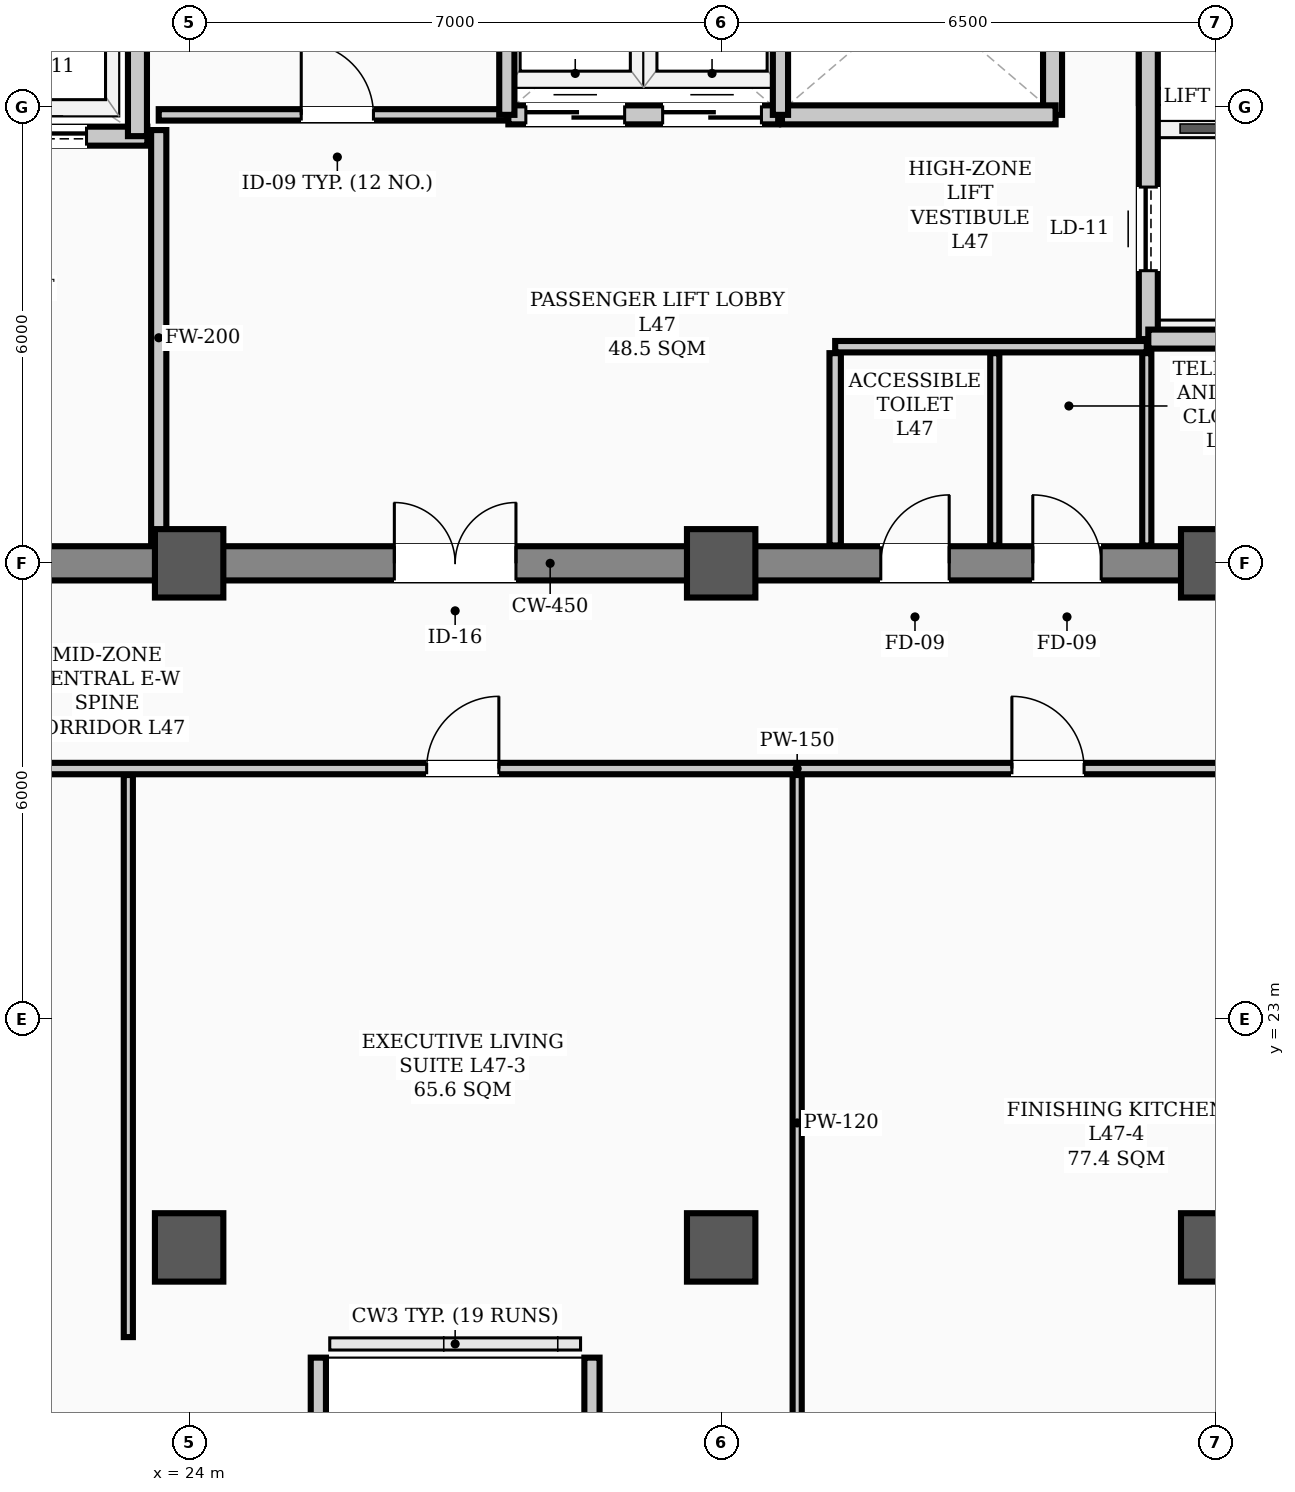
"""IFC4 building model, lengths in metres.
Left out: names, types, materials, properties, quantities, classifications, styles, units other than length and angle.
Written with IfcOpenShell. Run it as: python <this file> out.ifc"""

import sys

from ifc_helpers import new_model, si_unit, direction, frame, frame_2d, origin, origin_2d, place, context, subcontext, project, spatial, rectangle, hollow_rectangle, extrude, element, fill, save


model = new_model("IFC4")
c1 = context("Model", 3, precision=1e-05, world=origin(), true_north=direction((0.0, 1.0)))
c2 = subcontext(c1, "Body", "Model", "MODEL_VIEW")
j1 = project(units=[si_unit("LENGTHUNIT", "METRE"), si_unit("PLANEANGLEUNIT", "RADIAN")], contexts=[c1])
p1 = place(None, origin())
s1 = spatial("IfcSite", under=j1, at=p1, CompositionType="ELEMENT")
p2 = place(p1, origin())
s2 = spatial("IfcBuilding", under=s1, at=p2, CompositionType="ELEMENT")
p3 = place(p2, frame((0.0, 0.0, 189.0)))
s3 = spatial("IfcBuildingStorey", under=s2, at=p3, CompositionType="ELEMENT", Elevation=189.0)
for number, where, z_axis, x_axis in (
    (1, (24.0, 29.0, 0.0), (0.0, 0.0, 1.0), (1.0, 0.0, 0.0)),
    (2, (31.0, 29.0, 0.0), (0.0, 0.0, 1.0), (1.0, 0.0, 0.0)),
    (3, (37.5, 29.0, 0.0), (0.0, 0.0, 1.0), (1.0, 0.0, 0.0)),
    (4, (24.0, 20.0, 0.0), (0.0, 0.0, 1.0), (1.0, 0.0, 0.0)),
    (5, (31.0, 20.0, 0.0), (0.0, 0.0, 1.0), (1.0, 0.0, 0.0)),
    (6, (37.5, 20.0, 0.0), (0.0, 0.0, 1.0), (1.0, 0.0, 0.0)),
):
    element("IfcColumn", number, at=place(p3, frame(where, z_axis=z_axis, x_axis=x_axis)), inside=s3, PredefinedType="COLUMN", context=c2, shape_type="SweptSolid", body=[
        extrude(hollow_rectangle(XDim=0.9, YDim=0.9, WallThickness=0.035, InnerFilletRadius=0.017, OuterFilletRadius=0.052, at=origin_2d()), origin(), (0.0, 0.0, 1.0), 3.9),
    ])
for number, where, z_axis, x_axis in (
    (7, (25.7, 16.85, 0.0), (0.0, 0.0, 1.0), (0.0, 1.0, 0.0)),
    (8, (29.3, 18.55, 0.0), (0.0, 0.0, 1.0), (0.0, -1.0, 0.0)),
):
    element("IfcWall", number, at=place(p3, frame(where, z_axis=z_axis, x_axis=x_axis)), inside=s3, PredefinedType="PARAPET", context=c2, shape_type="SweptSolid", body=[
        extrude(rectangle(XDim=1.7, YDim=0.2, at=frame_2d((0.85, 0.0))), origin(), (0.0, 0.0, 1.0), 1.2),
    ])
p4 = place(p3, frame((13.5, 29.0, 0.0), z_axis=(0.0, 0.0, 1.0), x_axis=(1.0, 0.0, 0.0)))
e9 = element("IfcWall", 9, at=p4, inside=s3, PredefinedType="SHEAR", context=c2, shape_type="SweptSolid", body=[
    extrude(rectangle(XDim=30.5, YDim=0.45, at=frame_2d((15.25, 0.0))), origin(), (0.0, 0.0, 1.0), 3.72),
])
p5 = place(p4, frame((1.75, 0.0, 0.0)))
e10 = element("IfcOpeningElement", 10, at=p5, cuts=e9, PredefinedType="OPENING", context=c2, shape_type="SweptSolid", body=[
    extrude(rectangle(XDim=1.1, YDim=2.08, at=frame_2d((0.55, 1.04))), frame((0.0, 0.235, 0.0), z_axis=(0.0, -1.0, 0.0), x_axis=(1.0, 0.0, 0.0)), (0.0, 0.0, 1.0), 0.47),
])
p6 = place(p4, frame((26.7, 0.0, 0.0)))
e11 = element("IfcOpeningElement", 11, at=p6, cuts=e9, PredefinedType="OPENING", context=c2, shape_type="SweptSolid", body=[
    extrude(rectangle(XDim=1.1, YDim=2.08, at=frame_2d((0.55, 1.04))), frame((0.0, 0.235, 0.0), z_axis=(0.0, -1.0, 0.0), x_axis=(1.0, 0.0, 0.0)), (0.0, 0.0, 1.0), 0.47),
])
p7 = place(p4, frame((6.8, 0.0, 0.0)))
e12 = element("IfcOpeningElement", 12, at=p7, cuts=e9, PredefinedType="OPENING", context=c2, shape_type="SweptSolid", body=[
    extrude(rectangle(XDim=1.1, YDim=2.08, at=frame_2d((0.55, 1.04))), frame((0.0, 0.235, 0.0), z_axis=(0.0, -1.0, 0.0), x_axis=(1.0, 0.0, 0.0)), (0.0, 0.0, 1.0), 0.47),
])
p8 = place(p4, frame((13.2, 0.0, 0.0)))
e13 = element("IfcOpeningElement", 13, at=p8, cuts=e9, PredefinedType="OPENING", context=c2, shape_type="SweptSolid", body=[
    extrude(rectangle(XDim=1.6, YDim=2.08, at=frame_2d((0.8, 1.04))), frame((0.0, 0.235, 0.0), z_axis=(0.0, -1.0, 0.0), x_axis=(1.0, 0.0, 0.0)), (0.0, 0.0, 1.0), 0.47),
])
p9 = place(p4, frame((19.6, 0.0, 0.0)))
e14 = element("IfcOpeningElement", 14, at=p9, cuts=e9, PredefinedType="OPENING", context=c2, shape_type="SweptSolid", body=[
    extrude(rectangle(XDim=0.9, YDim=2.08, at=frame_2d((0.45, 1.04))), frame((0.0, 0.235, 0.0), z_axis=(0.0, -1.0, 0.0), x_axis=(1.0, 0.0, 0.0)), (0.0, 0.0, 1.0), 0.47),
])
p10 = place(p4, frame((21.6, 0.0, 0.0)))
e15 = element("IfcOpeningElement", 15, at=p10, cuts=e9, PredefinedType="OPENING", context=c2, shape_type="SweptSolid", body=[
    extrude(rectangle(XDim=0.9, YDim=2.08, at=frame_2d((0.45, 1.04))), frame((0.0, 0.235, 0.0), z_axis=(0.0, -1.0, 0.0), x_axis=(1.0, 0.0, 0.0)), (0.0, 0.0, 1.0), 0.47),
])
p11 = place(p3, frame((18.1, 34.62, 0.0), z_axis=(0.0, 0.0, 1.0), x_axis=(1.0, 0.0, 0.0)))
e16 = element("IfcWall", 16, at=p11, inside=s3, PredefinedType="STANDARD", context=c2, shape_type="SweptSolid", body=[
    extrude(rectangle(XDim=5.35, YDim=0.25, at=frame_2d((2.675, 0.0))), origin(), (0.0, 0.0, 1.0), 3.72),
])
p12 = place(p11, frame((0.85, 0.0, 0.0)))
e17 = element("IfcOpeningElement", 17, at=p12, cuts=e16, PredefinedType="OPENING", context=c2, shape_type="SweptSolid", body=[
    extrude(rectangle(XDim=1.1, YDim=2.08, at=frame_2d((0.55, 1.04))), frame((0.0, 0.135, 0.0), z_axis=(0.0, -1.0, 0.0), x_axis=(1.0, 0.0, 0.0)), (0.0, 0.0, 1.0), 0.27),
])
p13 = place(p11, frame((3.45, 0.0, 0.0)))
e18 = element("IfcOpeningElement", 18, at=p13, cuts=e16, PredefinedType="OPENING", context=c2, shape_type="SweptSolid", body=[
    extrude(rectangle(XDim=1.1, YDim=2.08, at=frame_2d((0.55, 1.04))), frame((0.0, 0.135, 0.0), z_axis=(0.0, -1.0, 0.0), x_axis=(1.0, 0.0, 0.0)), (0.0, 0.0, 1.0), 0.27),
])
p14 = place(p3, frame((36.62, 31.95, 0.0), z_axis=(0.0, 0.0, 1.0), x_axis=(0.0, 1.0, 0.0)))
e19 = element("IfcWall", 19, at=p14, inside=s3, PredefinedType="STANDARD", context=c2, shape_type="SweptSolid", body=[
    extrude(rectangle(XDim=6.0, YDim=0.25, at=frame_2d((3.0, 0.0))), origin(), (0.0, 0.0, 1.0), 3.35),
])
p15 = place(p14, frame((0.9, 0.0, 0.0)))
e20 = element("IfcOpeningElement", 20, at=p15, cuts=e19, PredefinedType="OPENING", context=c2, shape_type="SweptSolid", body=[
    extrude(rectangle(XDim=1.1, YDim=2.08, at=frame_2d((0.55, 1.04))), frame((0.0, 0.135, 0.0), z_axis=(0.0, -1.0, 0.0), x_axis=(1.0, 0.0, 0.0)), (0.0, 0.0, 1.0), 0.27),
])
p16 = place(p14, frame((4.0, 0.0, 0.0)))
e21 = element("IfcOpeningElement", 21, at=p16, cuts=e19, PredefinedType="OPENING", context=c2, shape_type="SweptSolid", body=[
    extrude(rectangle(XDim=1.1, YDim=2.08, at=frame_2d((0.55, 1.04))), frame((0.0, 0.135, 0.0), z_axis=(0.0, -1.0, 0.0), x_axis=(1.0, 0.0, 0.0)), (0.0, 0.0, 1.0), 0.27),
])
p17 = place(p3, frame((36.62, 31.95, 0.0), z_axis=(0.0, 0.0, 1.0), x_axis=(1.0, 0.0, 0.0)))
e22 = element("IfcWall", 22, at=p17, inside=s3, PredefinedType="STANDARD", context=c2, shape_type="SweptSolid", body=[
    extrude(rectangle(XDim=1.9, YDim=0.25, at=frame_2d((0.95, 0.0))), origin(), (0.0, 0.0, 1.0), 3.48),
])
p18 = place(p3, frame((23.32, 34.62, 0.0), z_axis=(0.0, 0.0, 1.0), x_axis=(0.0, 1.0, 0.0)))
e23 = element("IfcWall", 23, at=p18, inside=s3, PredefinedType="STANDARD", context=c2, shape_type="SweptSolid", body=[
    extrude(rectangle(XDim=3.33, YDim=0.25, at=frame_2d((1.665, 0.0))), origin(), (0.0, 0.0, 1.0), 3.35),
])
p19 = place(p3, frame((35.36, 34.9, 0.0), z_axis=(0.0, 0.0, 1.0), x_axis=(0.0, 1.0, 0.0)))
e24 = element("IfcWall", 24, at=p19, inside=s3, PredefinedType="STANDARD", context=c2, shape_type="SweptSolid", body=[
    extrude(rectangle(XDim=3.05, YDim=0.25, at=frame_2d((1.525, 0.0))), origin(), (0.0, 0.0, 1.0), 3.35),
])
p20 = place(p3, frame((28.2, 34.9, 0.0), z_axis=(0.0, 0.0, 1.0), x_axis=(1.0, 0.0, 0.0)))
e25 = element("IfcWall", 25, at=p20, inside=s3, PredefinedType="STANDARD", context=c2, shape_type="SweptSolid", body=[
    extrude(rectangle(XDim=3.55, YDim=0.25, at=frame_2d((1.775, 0.0))), origin(), (0.0, 0.0, 1.0), 3.72),
])
p21 = place(p20, frame((0.23, 0.0, 0.0)))
e26 = element("IfcOpeningElement", 26, at=p21, cuts=e25, PredefinedType="OPENING", context=c2, shape_type="SweptSolid", body=[
    extrude(rectangle(XDim=1.3, YDim=2.08, at=frame_2d((0.65, 1.04))), frame((0.0, 0.135, 0.0), z_axis=(0.0, -1.0, 0.0), x_axis=(1.0, 0.0, 0.0)), (0.0, 0.0, 1.0), 0.27),
])
p22 = place(p20, frame((2.03, 0.0, 0.0)))
e27 = element("IfcOpeningElement", 27, at=p22, cuts=e25, PredefinedType="OPENING", context=c2, shape_type="SweptSolid", body=[
    extrude(rectangle(XDim=1.3, YDim=2.08, at=frame_2d((0.65, 1.04))), frame((0.0, 0.135, 0.0), z_axis=(0.0, -1.0, 0.0), x_axis=(1.0, 0.0, 0.0)), (0.0, 0.0, 1.0), 0.27),
])
p23 = place(p3, frame((31.8, 34.9, 0.0), z_axis=(0.0, 0.0, 1.0), x_axis=(1.0, 0.0, 0.0)))
e28 = element("IfcWall", 28, at=p23, inside=s3, PredefinedType="STANDARD", context=c2, shape_type="SweptSolid", body=[
    extrude(rectangle(XDim=3.6, YDim=0.25, at=frame_2d((1.8, 0.0))), origin(), (0.0, 0.0, 1.0), 3.72),
])
p24 = place(p3, frame((23.6, 34.9, 0.0), z_axis=(0.0, 0.0, 1.0), x_axis=(1.0, 0.0, 0.0)))
e29 = element("IfcWall", 29, at=p24, inside=s3, PredefinedType="PARTITIONING", context=c2, shape_type="SweptSolid", body=[
    extrude(rectangle(XDim=4.58, YDim=0.15, at=frame_2d((2.29, 0.0))), origin(), (0.0, 0.0, 1.0), 3.72),
])
p25 = place(p24, frame((1.875, 0.0, 0.0)))
e30 = element("IfcOpeningElement", 30, at=p25, cuts=e29, PredefinedType="OPENING", context=c2, shape_type="SweptSolid", body=[
    extrude(rectangle(XDim=0.95, YDim=2.08, at=frame_2d((0.475, 1.04))), frame((0.0, 0.085, 0.0), z_axis=(0.0, -1.0, 0.0), x_axis=(1.0, 0.0, 0.0)), (0.0, 0.0, 1.0), 0.17),
])
p26 = place(p3, frame((32.5, 31.85, 0.0), z_axis=(0.0, 0.0, 1.0), x_axis=(1.0, 0.0, 0.0)))
e31 = element("IfcWall", 31, at=p26, inside=s3, PredefinedType="PARTITIONING", context=c2, shape_type="SweptSolid", body=[
    extrude(rectangle(XDim=4.1, YDim=0.15, at=frame_2d((2.05, 0.0))), origin(), (0.0, 0.0, 1.0), 3.72),
])
p27 = place(p3, frame((10.31, 26.3, 0.0), z_axis=(0.0, 0.0, 1.0), x_axis=(1.0, 0.0, 0.0)))
e32 = element("IfcWall", 32, at=p27, inside=s3, PredefinedType="PARTITIONING", context=c2, shape_type="SweptSolid", body=[
    extrude(rectangle(XDim=43.38, YDim=0.15, at=frame_2d((21.69, 0.0))), origin(), (0.0, 0.0, 1.0), 3.2),
])
p28 = place(p27, frame((0.97, 0.0, 0.0)))
e33 = element("IfcOpeningElement", 33, at=p28, cuts=e32, PredefinedType="OPENING", context=c2, shape_type="SweptSolid", body=[
    extrude(rectangle(XDim=0.95, YDim=2.08, at=frame_2d((0.475, 1.04))), frame((0.0, 0.085, 0.0), z_axis=(0.0, -1.0, 0.0), x_axis=(1.0, 0.0, 0.0)), (0.0, 0.0, 1.0), 0.17),
])
p29 = place(p27, frame((8.315, 0.0, 0.0)))
e34 = element("IfcOpeningElement", 34, at=p29, cuts=e32, PredefinedType="OPENING", context=c2, shape_type="SweptSolid", body=[
    extrude(rectangle(XDim=0.95, YDim=2.08, at=frame_2d((0.475, 1.04))), frame((0.0, 0.085, 0.0), z_axis=(0.0, -1.0, 0.0), x_axis=(1.0, 0.0, 0.0)), (0.0, 0.0, 1.0), 0.17),
])
p30 = place(p27, frame((16.815, 0.0, 0.0)))
e35 = element("IfcOpeningElement", 35, at=p30, cuts=e32, PredefinedType="OPENING", context=c2, shape_type="SweptSolid", body=[
    extrude(rectangle(XDim=0.95, YDim=2.08, at=frame_2d((0.475, 1.04))), frame((0.0, 0.085, 0.0), z_axis=(0.0, -1.0, 0.0), x_axis=(1.0, 0.0, 0.0)), (0.0, 0.0, 1.0), 0.17),
])
p31 = place(p27, frame((24.515, 0.0, 0.0)))
e36 = element("IfcOpeningElement", 36, at=p31, cuts=e32, PredefinedType="OPENING", context=c2, shape_type="SweptSolid", body=[
    extrude(rectangle(XDim=0.95, YDim=2.08, at=frame_2d((0.475, 1.04))), frame((0.0, 0.085, 0.0), z_axis=(0.0, -1.0, 0.0), x_axis=(1.0, 0.0, 0.0)), (0.0, 0.0, 1.0), 0.17),
])
p32 = place(p27, frame((31.69, 0.0, 0.0)))
e37 = element("IfcOpeningElement", 37, at=p32, cuts=e32, PredefinedType="OPENING", context=c2, shape_type="SweptSolid", body=[
    extrude(rectangle(XDim=0.95, YDim=2.08, at=frame_2d((0.475, 1.04))), frame((0.0, 0.085, 0.0), z_axis=(0.0, -1.0, 0.0), x_axis=(1.0, 0.0, 0.0)), (0.0, 0.0, 1.0), 0.17),
])
p33 = place(p3, frame((23.6, 29.235, 0.0), z_axis=(0.0, 0.0, 1.0), x_axis=(0.0, 1.0, 0.0)))
e38 = element("IfcWall", 38, at=p33, inside=s3, PredefinedType="STANDARD", context=c2, shape_type="SweptSolid", body=[
    extrude(rectangle(XDim=5.465, YDim=0.2, at=frame_2d((2.732, 0.0))), origin(), (0.0, 0.0, 1.0), 3.2),
])
p34 = place(p3, frame((32.5, 29.235, 0.0), z_axis=(0.0, 0.0, 1.0), x_axis=(0.0, 1.0, 0.0)))
e39 = element("IfcWall", 39, at=p34, inside=s3, PredefinedType="PARTITIONING", context=c2, shape_type="SweptSolid", body=[
    extrude(rectangle(XDim=2.53, YDim=0.15, at=frame_2d((1.265, 0.0))), origin(), (0.0, 0.0, 1.0), 3.35),
])
for number, where, z_axis, x_axis in (
    (40, (36.6, 29.235, 0.0), (0.0, 0.0, 1.0), (0.0, 1.0, 0.0)),
    (41, (34.6, 29.235, 0.0), (0.0, 0.0, 1.0), (0.0, 1.0, 0.0)),
):
    element("IfcWall", number, at=place(p3, frame(where, z_axis=z_axis, x_axis=x_axis)), inside=s3, PredefinedType="PARTITIONING", context=c2, shape_type="SweptSolid", body=[
        extrude(rectangle(XDim=2.53, YDim=0.12, at=frame_2d((1.265, 0.0))), origin(), (0.0, 0.0, 1.0), 3.35),
    ])
p35 = place(p3, frame((23.2, 18.82, 0.0), z_axis=(0.0, 0.0, 1.0), x_axis=(0.0, 1.0, 0.0)))
e42 = element("IfcWall", 42, at=p35, inside=s3, PredefinedType="PARTITIONING", context=c2, shape_type="SweptSolid", body=[
    extrude(rectangle(XDim=7.395, YDim=0.12, at=frame_2d((3.698, 0.0))), origin(), (0.0, 0.0, 1.0), 3.1),
])
p36 = place(p3, frame((32.0, 17.06, 0.0), z_axis=(0.0, 0.0, 1.0), x_axis=(0.0, 1.0, 0.0)))
e43 = element("IfcWall", 43, at=p36, inside=s3, PredefinedType="PARTITIONING", context=c2, shape_type="SweptSolid", body=[
    extrude(rectangle(XDim=9.155, YDim=0.12, at=frame_2d((4.578, 0.0))), origin(), (0.0, 0.0, 1.0), 3.1),
])
for number, where, z_axis, x_axis in (
    (44, (28.18, 34.9, 0.0), (0.0, 0.0, 1.0), (0.0, 1.0, 0.0)),
    (45, (31.78, 34.9, 0.0), (0.0, 0.0, 1.0), (0.0, 1.0, 0.0)),
):
    element("IfcWall", number, at=place(p3, frame(where, z_axis=z_axis, x_axis=x_axis)), inside=s3, PredefinedType="STANDARD", context=c2, shape_type="SweptSolid", body=[
        extrude(rectangle(XDim=3.12, YDim=0.2, at=frame_2d((1.56, 0.0))), origin(), (0.0, 0.0, 1.0), 3.35),
    ])
p37 = place(p8, origin())
e46 = element("IfcDoor", 46, at=p37, inside=s3, OperationType="DOUBLE_DOOR_SINGLE_SWING", PredefinedType="DOOR", context=c2, shape_type="SweptSolid", body=[
    extrude(rectangle(XDim=1.6, YDim=2.08, at=frame_2d((0.8, 1.04))), frame((0.0, 0.025, 0.0), z_axis=(0.0, -1.0, 0.0), x_axis=(1.0, 0.0, 0.0)), (0.0, 0.0, 1.0), 0.05),
])
fill(e13, e46)
p38 = place(p25, origin())
e47 = element("IfcDoor", 47, at=p38, inside=s3, OperationType="SINGLE_SWING_LEFT", PredefinedType="DOOR", context=c2, shape_type="SweptSolid", body=[
    extrude(rectangle(XDim=0.95, YDim=2.08, at=frame_2d((0.475, 1.04))), frame((0.0, 0.025, 0.0), z_axis=(0.0, -1.0, 0.0), x_axis=(1.0, 0.0, 0.0)), (0.0, 0.0, 1.0), 0.05),
])
fill(e30, e47)
p39 = place(p9, origin())
e48 = element("IfcDoor", 48, at=p39, inside=s3, OperationType="SINGLE_SWING_RIGHT", PredefinedType="DOOR", context=c2, shape_type="SweptSolid", body=[
    extrude(rectangle(XDim=0.9, YDim=2.08, at=frame_2d((0.45, 1.04))), frame((0.0, 0.025, 0.0), z_axis=(0.0, -1.0, 0.0), x_axis=(1.0, 0.0, 0.0)), (0.0, 0.0, 1.0), 0.05),
])
fill(e14, e48)
p40 = place(p10, origin())
e49 = element("IfcDoor", 49, at=p40, inside=s3, OperationType="SINGLE_SWING_LEFT", PredefinedType="DOOR", context=c2, shape_type="SweptSolid", body=[
    extrude(rectangle(XDim=0.9, YDim=2.08, at=frame_2d((0.45, 1.04))), frame((0.0, 0.025, 0.0), z_axis=(0.0, -1.0, 0.0), x_axis=(1.0, 0.0, 0.0)), (0.0, 0.0, 1.0), 0.05),
])
fill(e15, e49)
p41 = place(p30, origin())
e50 = element("IfcDoor", 50, at=p41, inside=s3, OperationType="SINGLE_SWING_RIGHT", PredefinedType="DOOR", context=c2, shape_type="SweptSolid", body=[
    extrude(rectangle(XDim=0.95, YDim=2.08, at=frame_2d((0.475, 1.04))), frame((0.0, 0.025, 0.0), z_axis=(0.0, -1.0, 0.0), x_axis=(1.0, 0.0, 0.0)), (0.0, 0.0, 1.0), 0.05),
])
fill(e35, e50)
p42 = place(p31, origin())
e51 = element("IfcDoor", 51, at=p42, inside=s3, OperationType="SINGLE_SWING_LEFT", PredefinedType="DOOR", context=c2, shape_type="SweptSolid", body=[
    extrude(rectangle(XDim=0.95, YDim=2.08, at=frame_2d((0.475, 1.04))), frame((0.0, 0.025, 0.0), z_axis=(0.0, -1.0, 0.0), x_axis=(1.0, 0.0, 0.0)), (0.0, 0.0, 1.0), 0.05),
])
fill(e36, e51)
p43 = place(p13, origin())
e52 = element("IfcDoor", 52, at=p43, inside=s3, OperationType="SLIDING_TO_LEFT", PredefinedType="DOOR", context=c2, shape_type="SweptSolid", body=[
    extrude(rectangle(XDim=1.1, YDim=2.08, at=frame_2d((0.55, 1.04))), frame((0.0, 0.025, 0.0), z_axis=(0.0, -1.0, 0.0), x_axis=(1.0, 0.0, 0.0)), (0.0, 0.0, 1.0), 0.05),
])
fill(e18, e52)
p44 = place(p15, origin())
e53 = element("IfcDoor", 53, at=p44, inside=s3, OperationType="SLIDING_TO_LEFT", PredefinedType="DOOR", context=c2, shape_type="SweptSolid", body=[
    extrude(rectangle(XDim=1.1, YDim=2.08, at=frame_2d((0.55, 1.04))), frame((0.0, 0.025, 0.0), z_axis=(0.0, -1.0, 0.0), x_axis=(1.0, 0.0, 0.0)), (0.0, 0.0, 1.0), 0.05),
])
fill(e20, e53)
p45 = place(p21, origin())
e54 = element("IfcDoor", 54, at=p45, inside=s3, OperationType="DOUBLE_DOOR_SLIDING", PredefinedType="DOOR", context=c2, shape_type="SweptSolid", body=[
    extrude(rectangle(XDim=1.3, YDim=2.08, at=frame_2d((0.65, 1.04))), frame((0.0, 0.025, 0.0), z_axis=(0.0, -1.0, 0.0), x_axis=(1.0, 0.0, 0.0)), (0.0, 0.0, 1.0), 0.05),
])
fill(e26, e54)
p46 = place(p22, origin())
e55 = element("IfcDoor", 55, at=p46, inside=s3, OperationType="DOUBLE_DOOR_SLIDING", PredefinedType="DOOR", context=c2, shape_type="SweptSolid", body=[
    extrude(rectangle(XDim=1.3, YDim=2.08, at=frame_2d((0.65, 1.04))), frame((0.0, 0.025, 0.0), z_axis=(0.0, -1.0, 0.0), x_axis=(1.0, 0.0, 0.0)), (0.0, 0.0, 1.0), 0.05),
])
fill(e27, e55)
save(model, sys.argv[1])
